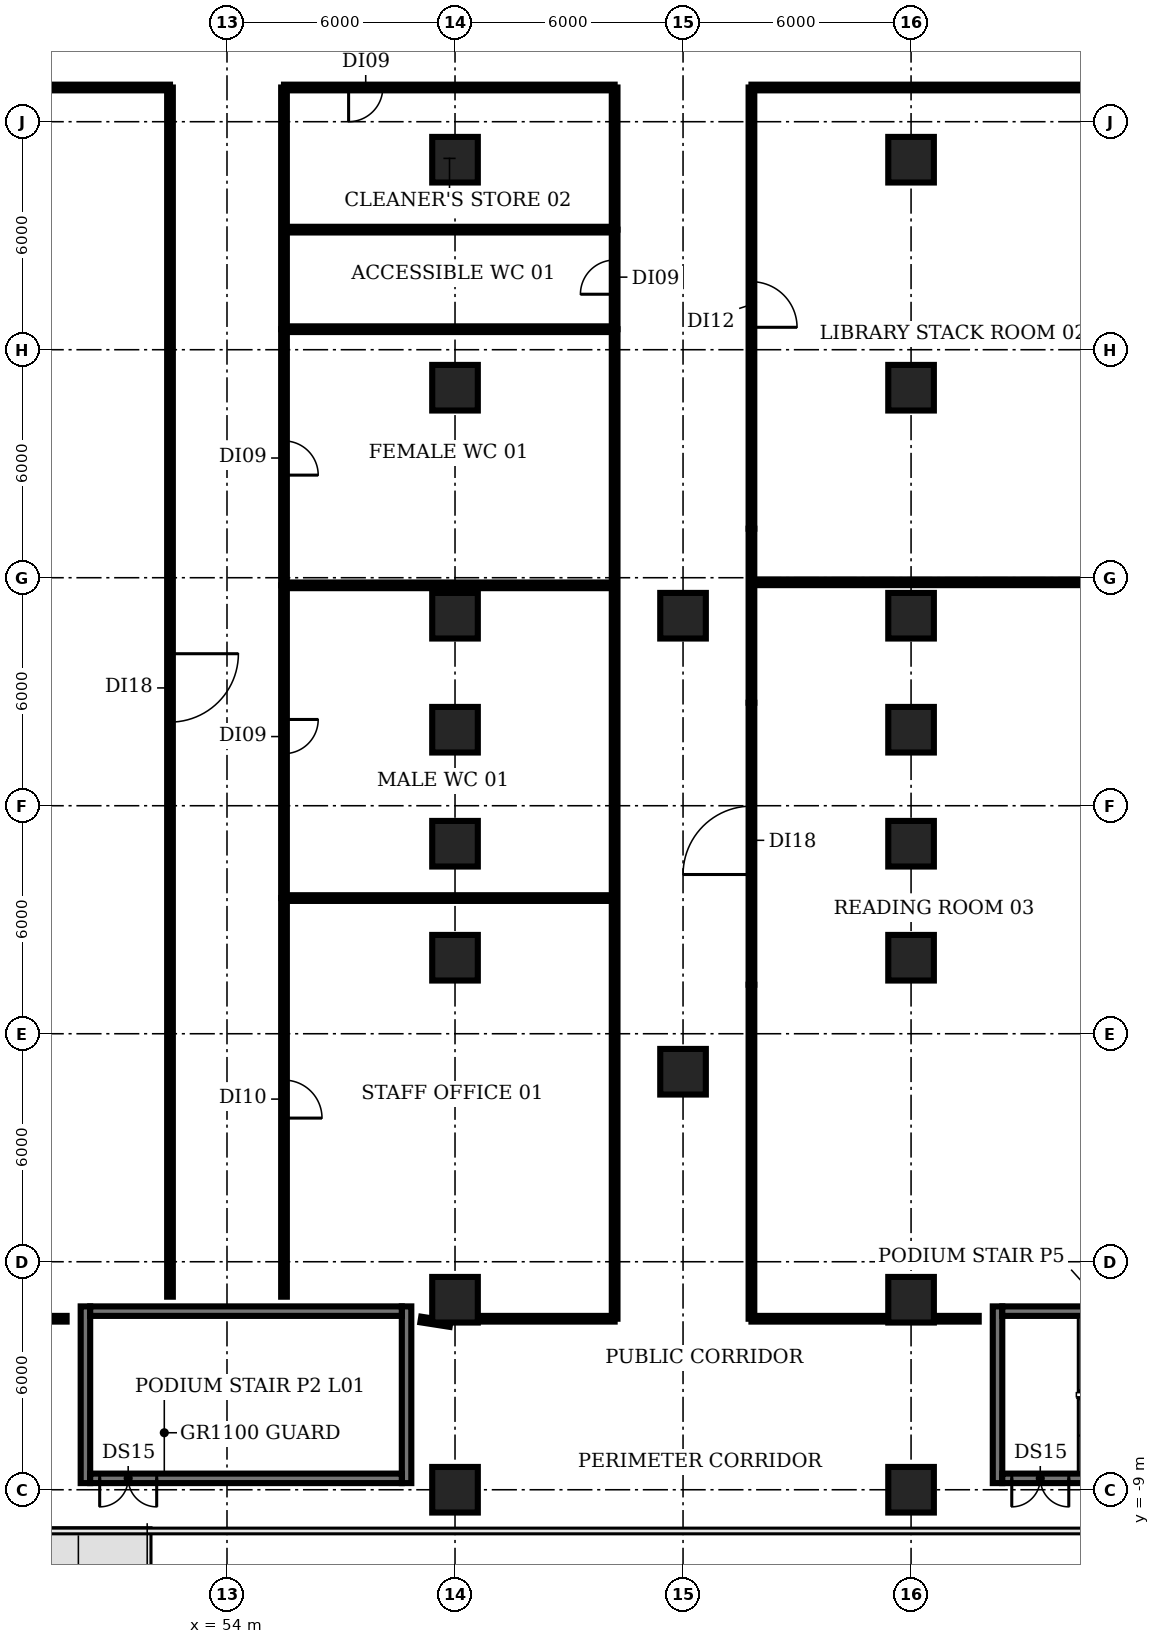
"""IFC4 building model, lengths in metres.
Left out: names, types, materials, properties, quantities, classifications, styles, units other than length and angle.
Written with IfcOpenShell. Run it as: python <this file> out.ifc"""

import sys

from ifc_helpers import new_model, si_unit, direction, frame, frame_2d, origin, origin_2d, place, context, subcontext, project, spatial, rectangle, extrude, element, fill, save


model = new_model("IFC4")
c1 = context("Model", 3, precision=1e-05, world=origin(), true_north=direction((0.0, 1.0)))
c2 = subcontext(c1, "Body", "Model", "MODEL_VIEW")
j1 = project(units=[si_unit("LENGTHUNIT", "METRE"), si_unit("PLANEANGLEUNIT", "RADIAN")], contexts=[c1])
p1 = place(None, origin())
s1 = spatial("IfcSite", under=j1, at=p1, CompositionType="ELEMENT")
p2 = place(p1, origin())
s2 = spatial("IfcBuilding", under=s1, at=p2, CompositionType="ELEMENT")
p3 = place(p2, frame((0.0, 0.0, 6.0)))
s3 = spatial("IfcBuildingStorey", under=s2, at=p3, CompositionType="ELEMENT", Elevation=6.0)
for number, where, z_axis, x_axis in (
    (1, (60.0, -9.0, 0.0), (0.0, 0.0, 1.0), (1.0, 0.0, 0.0)),
    (2, (60.0, -4.0, 0.0), (0.0, 0.0, 1.0), (1.0, 0.0, 0.0)),
    (3, (60.0, 5.0, 0.0), (0.0, 0.0, 1.0), (1.0, 0.0, 0.0)),
    (4, (60.0, 8.0, 0.0), (0.0, 0.0, 1.0), (1.0, 0.0, 0.0)),
    (5, (60.0, 11.0, 0.0), (0.0, 0.0, 1.0), (1.0, 0.0, 0.0)),
    (6, (60.0, 14.0, 0.0), (0.0, 0.0, 1.0), (1.0, 0.0, 0.0)),
    (7, (60.0, 20.0, 0.0), (0.0, 0.0, 1.0), (1.0, 0.0, 0.0)),
    (8, (60.0, 26.0, 0.0), (0.0, 0.0, 1.0), (1.0, 0.0, 0.0)),
    (9, (66.0, 2.0, 0.0), (0.0, 0.0, 1.0), (1.0, 0.0, 0.0)),
    (10, (66.0, 14.0, 0.0), (0.0, 0.0, 1.0), (1.0, 0.0, 0.0)),
    (11, (72.0, -9.0, 0.0), (0.0, 0.0, 1.0), (1.0, 0.0, 0.0)),
    (12, (72.0, -4.0, 0.0), (0.0, 0.0, 1.0), (1.0, 0.0, 0.0)),
    (13, (72.0, 5.0, 0.0), (0.0, 0.0, 1.0), (1.0, 0.0, 0.0)),
    (14, (72.0, 8.0, 0.0), (0.0, 0.0, 1.0), (1.0, 0.0, 0.0)),
    (15, (72.0, 11.0, 0.0), (0.0, 0.0, 1.0), (1.0, 0.0, 0.0)),
    (16, (72.0, 14.0, 0.0), (0.0, 0.0, 1.0), (1.0, 0.0, 0.0)),
    (17, (72.0, 20.0, 0.0), (0.0, 0.0, 1.0), (1.0, 0.0, 0.0)),
    (18, (72.0, 26.0, 0.0), (0.0, 0.0, 1.0), (1.0, 0.0, 0.0)),
):
    element("IfcColumn", number, at=place(p3, frame(where, z_axis=z_axis, x_axis=x_axis)), inside=s3, PredefinedType="COLUMN", context=c2, shape_type="SweptSolid", body=[
        extrude(rectangle(XDim=1.2, YDim=1.2, at=origin_2d()), origin(), (0.0, 0.0, 1.0), 4.6),
    ])
for number, where, z_axis, x_axis in (
    (19, (50.275, -8.825, 0.0), (0.0, 0.0, 1.0), (0.0, 1.0, 0.0)),
    (20, (58.725, -8.825, 0.0), (0.0, 0.0, 1.0), (0.0, 1.0, 0.0)),
):
    element("IfcWall", number, at=place(p3, frame(where, z_axis=z_axis, x_axis=x_axis)), inside=s3, PredefinedType="SHEAR", context=c2, shape_type="SweptSolid", body=[
        extrude(rectangle(XDim=4.65, YDim=0.25, at=frame_2d((2.325, 0.0))), origin(), (0.0, 0.0, 1.0), 4.6),
    ])
p4 = place(p3, frame((58.6, -8.7, 0.0), z_axis=(0.0, 0.0, 1.0), x_axis=(-1.0, 0.0, 0.0)))
e21 = element("IfcWall", 21, at=p4, inside=s3, PredefinedType="SHEAR", context=c2, shape_type="SweptSolid", body=[
    extrude(rectangle(XDim=8.2, YDim=0.25, at=frame_2d((4.1, 0.0))), origin(), (0.0, 0.0, 1.0), 4.6),
])
p5 = place(p4, frame((6.45, 0.0, 0.0)))
e22 = element("IfcOpeningElement", 22, at=p5, cuts=e21, PredefinedType="OPENING", context=c2, shape_type="SweptSolid", body=[
    extrude(rectangle(XDim=1.5, YDim=2.1, at=frame_2d((0.75, 1.05))), frame((0.0, 0.135, 0.0), z_axis=(0.0, -1.0, 0.0), x_axis=(1.0, 0.0, 0.0)), (0.0, 0.0, 1.0), 0.27),
])
p6 = place(p3, frame((50.4, -4.3, 0.0), z_axis=(0.0, 0.0, 1.0), x_axis=(1.0, 0.0, 0.0)))
e23 = element("IfcWall", 23, at=p6, inside=s3, PredefinedType="SHEAR", context=c2, shape_type="SweptSolid", body=[
    extrude(rectangle(XDim=8.2, YDim=0.25, at=frame_2d((4.1, 0.0))), origin(), (0.0, 0.0, 1.0), 4.6),
])
p7 = place(p3, frame((74.275, -8.825, 0.0), z_axis=(0.0, 0.0, 1.0), x_axis=(0.0, 1.0, 0.0)))
e24 = element("IfcWall", 24, at=p7, inside=s3, PredefinedType="SHEAR", context=c2, shape_type="SweptSolid", body=[
    extrude(rectangle(XDim=4.65, YDim=0.25, at=frame_2d((2.325, 0.0))), origin(), (0.0, 0.0, 1.0), 4.6),
])
p8 = place(p3, frame((82.6, -8.7, 0.0), z_axis=(0.0, 0.0, 1.0), x_axis=(-1.0, 0.0, 0.0)))
e25 = element("IfcWall", 25, at=p8, inside=s3, PredefinedType="SHEAR", context=c2, shape_type="SweptSolid", body=[
    extrude(rectangle(XDim=8.2, YDim=0.25, at=frame_2d((4.1, 0.0))), origin(), (0.0, 0.0, 1.0), 4.6),
])
p9 = place(p8, frame((6.45, 0.0, 0.0)))
e26 = element("IfcOpeningElement", 26, at=p9, cuts=e25, PredefinedType="OPENING", context=c2, shape_type="SweptSolid", body=[
    extrude(rectangle(XDim=1.5, YDim=2.1, at=frame_2d((0.75, 1.05))), frame((0.0, 0.135, 0.0), z_axis=(0.0, -1.0, 0.0), x_axis=(1.0, 0.0, 0.0)), (0.0, 0.0, 1.0), 0.27),
])
p10 = place(p3, frame((74.4, -4.3, 0.0), z_axis=(0.0, 0.0, 1.0), x_axis=(1.0, 0.0, 0.0)))
e27 = element("IfcWall", 27, at=p10, inside=s3, PredefinedType="SHEAR", context=c2, shape_type="SweptSolid", body=[
    extrude(rectangle(XDim=8.2, YDim=0.25, at=frame_2d((4.1, 0.0))), origin(), (0.0, 0.0, 1.0), 4.6),
])
p11 = place(p3, frame((31.5, 27.9, 0.0), z_axis=(0.0, 0.0, 1.0), x_axis=(1.0, 0.0, 0.0)))
e28 = element("IfcWall", 28, at=p11, inside=s3, PredefinedType="PARTITIONING", context=c2, shape_type="SweptSolid", body=[
    extrude(rectangle(XDim=21.0, YDim=0.15, at=frame_2d((10.5, 0.0))), origin(), (0.0, 0.0, 1.0), 3.18),
])
p12 = place(p3, frame((48.46, -4.5, 0.0), z_axis=(0.0, 0.0, 1.0), x_axis=(1.0, 0.0, 0.0)))
e29 = element("IfcWall", 29, at=p12, inside=s3, PredefinedType="PARTITIONING", context=c2, shape_type="SweptSolid", body=[
    extrude(rectangle(XDim=1.32, YDim=0.15, at=frame_2d((0.66, 0.0))), origin(), (0.0, 0.0, 1.0), 3.18),
])
p13 = place(p3, frame((52.5, 27.9, 0.0), z_axis=(0.0, 0.0, 1.0), x_axis=(0.0, -1.0, 0.0)))
e30 = element("IfcWall", 30, at=p13, inside=s3, PredefinedType="PARTITIONING", context=c2, shape_type="SweptSolid", body=[
    extrude(rectangle(XDim=31.82, YDim=0.15, at=frame_2d((15.91, 0.0))), origin(), (0.0, 0.0, 1.0), 3.18),
])
p14 = place(p13, frame((14.9, 0.0, 0.0)))
e31 = element("IfcOpeningElement", 31, at=p14, cuts=e30, PredefinedType="OPENING", context=c2, shape_type="SweptSolid", body=[
    extrude(rectangle(XDim=1.8, YDim=2.1, at=frame_2d((0.9, 1.05))), frame((0.0, 0.085, 0.0), z_axis=(0.0, -1.0, 0.0), x_axis=(1.0, 0.0, 0.0)), (0.0, 0.0, 1.0), 0.17),
])
p15 = place(p3, frame((55.5, 6.57, 0.0), z_axis=(0.0, 0.0, 1.0), x_axis=(0.0, -1.0, 0.0)))
e32 = element("IfcWall", 32, at=p15, inside=s3, PredefinedType="PARTITIONING", context=c2, shape_type="SweptSolid", body=[
    extrude(rectangle(XDim=10.49, YDim=0.15, at=frame_2d((5.245, 0.0))), origin(), (0.0, 0.0, 1.0), 3.18),
])
p16 = place(p15, frame((4.79, 0.0, 0.0)))
e33 = element("IfcOpeningElement", 33, at=p16, cuts=e32, PredefinedType="OPENING", context=c2, shape_type="SweptSolid", body=[
    extrude(rectangle(XDim=1.0, YDim=2.1, at=frame_2d((0.5, 1.05))), frame((0.0, 0.085, 0.0), z_axis=(0.0, -1.0, 0.0), x_axis=(1.0, 0.0, 0.0)), (0.0, 0.0, 1.0), 0.17),
])
p17 = place(p3, frame((55.5, 6.57, 0.0), z_axis=(0.0, 0.0, 1.0), x_axis=(1.0, 0.0, 0.0)))
e34 = element("IfcWall", 34, at=p17, inside=s3, PredefinedType="PARTITIONING", context=c2, shape_type="SweptSolid", body=[
    extrude(rectangle(XDim=8.7, YDim=0.15, at=frame_2d((4.35, 0.0))), origin(), (0.0, 0.0, 1.0), 3.18),
])
p18 = place(p3, frame((55.5, 14.8, 0.0), z_axis=(0.0, 0.0, 1.0), x_axis=(0.0, -1.0, 0.0)))
e35 = element("IfcWall", 35, at=p18, inside=s3, PredefinedType="PARTITIONING", context=c2, shape_type="SweptSolid", body=[
    extrude(rectangle(XDim=8.23, YDim=0.15, at=frame_2d((4.115, 0.0))), origin(), (0.0, 0.0, 1.0), 3.18),
])
p19 = place(p18, frame((3.53, 0.0, 0.0)))
e36 = element("IfcOpeningElement", 36, at=p19, cuts=e35, PredefinedType="OPENING", context=c2, shape_type="SweptSolid", body=[
    extrude(rectangle(XDim=0.9, YDim=2.1, at=frame_2d((0.45, 1.05))), frame((0.0, 0.085, 0.0), z_axis=(0.0, -1.0, 0.0), x_axis=(1.0, 0.0, 0.0)), (0.0, 0.0, 1.0), 0.17),
])
p20 = place(p3, frame((55.5, 14.8, 0.0), z_axis=(0.0, 0.0, 1.0), x_axis=(1.0, 0.0, 0.0)))
e37 = element("IfcWall", 37, at=p20, inside=s3, PredefinedType="PARTITIONING", context=c2, shape_type="SweptSolid", body=[
    extrude(rectangle(XDim=8.7, YDim=0.15, at=frame_2d((4.35, 0.0))), origin(), (0.0, 0.0, 1.0), 3.18),
])
p21 = place(p3, frame((55.5, 21.54, 0.0), z_axis=(0.0, 0.0, 1.0), x_axis=(0.0, -1.0, 0.0)))
e38 = element("IfcWall", 38, at=p21, inside=s3, PredefinedType="PARTITIONING", context=c2, shape_type="SweptSolid", body=[
    extrude(rectangle(XDim=6.74, YDim=0.15, at=frame_2d((3.37, 0.0))), origin(), (0.0, 0.0, 1.0), 3.18),
])
p22 = place(p21, frame((2.94, 0.0, 0.0)))
e39 = element("IfcOpeningElement", 39, at=p22, cuts=e38, PredefinedType="OPENING", context=c2, shape_type="SweptSolid", body=[
    extrude(rectangle(XDim=0.9, YDim=2.1, at=frame_2d((0.45, 1.05))), frame((0.0, 0.085, 0.0), z_axis=(0.0, -1.0, 0.0), x_axis=(1.0, 0.0, 0.0)), (0.0, 0.0, 1.0), 0.17),
])
p23 = place(p3, frame((55.5, 21.54, 0.0), z_axis=(0.0, 0.0, 1.0), x_axis=(0.0, 1.0, 0.0)))
e40 = element("IfcWall", 40, at=p23, inside=s3, PredefinedType="PARTITIONING", context=c2, shape_type="SweptSolid", body=[
    extrude(rectangle(XDim=6.36, YDim=0.15, at=frame_2d((3.18, 0.0))), origin(), (0.0, 0.0, 1.0), 3.18),
])
for number, where, z_axis, x_axis in (
    (41, (55.5, 21.54, 0.0), (0.0, 0.0, 1.0), (1.0, 0.0, 0.0)),
    (42, (55.5, 24.16, 0.0), (0.0, 0.0, 1.0), (1.0, 0.0, 0.0)),
):
    element("IfcWall", number, at=place(p3, frame(where, z_axis=z_axis, x_axis=x_axis)), inside=s3, PredefinedType="PARTITIONING", context=c2, shape_type="SweptSolid", body=[
        extrude(rectangle(XDim=8.7, YDim=0.15, at=frame_2d((4.35, 0.0))), origin(), (0.0, 0.0, 1.0), 3.18),
    ])
p24 = place(p3, frame((59.1, -4.52, 0.0), z_axis=(0.0, 0.0, 1.0), x_axis=(0.988098486873, -0.153822560892, 0.0)))
e43 = element("IfcWall", 43, at=p24, inside=s3, PredefinedType="PARTITIONING", context=c2, shape_type="SweptSolid", body=[
    extrude(rectangle(XDim=0.779, YDim=0.15, at=frame_2d((0.39, 0.0))), origin(), (0.0, 0.0, 1.0), 3.18),
])
p25 = place(p3, frame((60.46, -4.5, 0.0), z_axis=(0.0, 0.0, 1.0), x_axis=(1.0, 0.0, 0.0)))
e44 = element("IfcWall", 44, at=p25, inside=s3, PredefinedType="PARTITIONING", context=c2, shape_type="SweptSolid", body=[
    extrude(rectangle(XDim=3.74, YDim=0.15, at=frame_2d((1.87, 0.0))), origin(), (0.0, 0.0, 1.0), 3.18),
])
p26 = place(p3, frame((64.2, -4.5, 0.0), z_axis=(0.0, 0.0, 1.0), x_axis=(0.0, 1.0, 0.0)))
e45 = element("IfcWall", 45, at=p26, inside=s3, PredefinedType="PARTITIONING", context=c2, shape_type="SweptSolid", body=[
    extrude(rectangle(XDim=26.04, YDim=0.15, at=frame_2d((13.02, 0.0))), origin(), (0.0, 0.0, 1.0), 3.18),
])
p27 = place(p3, frame((64.2, 21.54, 0.0), z_axis=(0.0, 0.0, 1.0), x_axis=(0.0, 1.0, 0.0)))
e46 = element("IfcWall", 46, at=p27, inside=s3, PredefinedType="PARTITIONING", context=c2, shape_type="SweptSolid", body=[
    extrude(rectangle(XDim=2.62, YDim=0.15, at=frame_2d((1.31, 0.0))), origin(), (0.0, 0.0, 1.0), 3.18),
])
p28 = place(p27, frame((0.92, 0.0, 0.0)))
e47 = element("IfcOpeningElement", 47, at=p28, cuts=e46, PredefinedType="OPENING", context=c2, shape_type="SweptSolid", body=[
    extrude(rectangle(XDim=0.9, YDim=2.1, at=frame_2d((0.45, 1.05))), frame((0.0, 0.085, 0.0), z_axis=(0.0, -1.0, 0.0), x_axis=(1.0, 0.0, 0.0)), (0.0, 0.0, 1.0), 0.17),
])
p29 = place(p3, frame((64.2, 24.16, 0.0), z_axis=(0.0, 0.0, 1.0), x_axis=(0.0, 1.0, 0.0)))
e48 = element("IfcWall", 48, at=p29, inside=s3, PredefinedType="PARTITIONING", context=c2, shape_type="SweptSolid", body=[
    extrude(rectangle(XDim=3.74, YDim=0.15, at=frame_2d((1.87, 0.0))), origin(), (0.0, 0.0, 1.0), 3.18),
])
p30 = place(p3, frame((64.2, 27.9, 0.0), z_axis=(0.0, 0.0, 1.0), x_axis=(-1.0, 0.0, 0.0)))
e49 = element("IfcWall", 49, at=p30, inside=s3, PredefinedType="PARTITIONING", context=c2, shape_type="SweptSolid", body=[
    extrude(rectangle(XDim=8.7, YDim=0.15, at=frame_2d((4.35, 0.0))), origin(), (0.0, 0.0, 1.0), 3.18),
])
p31 = place(p30, frame((6.1, 0.0, 0.0)))
e50 = element("IfcOpeningElement", 50, at=p31, cuts=e49, PredefinedType="OPENING", context=c2, shape_type="SweptSolid", body=[
    extrude(rectangle(XDim=0.9, YDim=2.1, at=frame_2d((0.45, 1.05))), frame((0.0, 0.085, 0.0), z_axis=(0.0, -1.0, 0.0), x_axis=(1.0, 0.0, 0.0)), (0.0, 0.0, 1.0), 0.17),
])
p32 = place(p3, frame((67.8, -4.5, 0.0), z_axis=(0.0, 0.0, 1.0), x_axis=(0.0, 1.0, 0.0)))
e51 = element("IfcWall", 51, at=p32, inside=s3, PredefinedType="PARTITIONING", context=c2, shape_type="SweptSolid", body=[
    extrude(rectangle(XDim=8.79, YDim=0.15, at=frame_2d((4.395, 0.0))), origin(), (0.0, 0.0, 1.0), 3.18),
])
p33 = place(p3, frame((67.8, -4.5, 0.0), z_axis=(0.0, 0.0, 1.0), x_axis=(1.0, 0.0, 0.0)))
e52 = element("IfcWall", 52, at=p33, inside=s3, PredefinedType="PARTITIONING", context=c2, shape_type="SweptSolid", body=[
    extrude(rectangle(XDim=3.74, YDim=0.15, at=frame_2d((1.87, 0.0))), origin(), (0.0, 0.0, 1.0), 3.18),
])
p34 = place(p3, frame((67.8, 4.29, 0.0), z_axis=(0.0, 0.0, 1.0), x_axis=(0.0, 1.0, 0.0)))
e53 = element("IfcWall", 53, at=p34, inside=s3, PredefinedType="PARTITIONING", context=c2, shape_type="SweptSolid", body=[
    extrude(rectangle(XDim=7.42, YDim=0.15, at=frame_2d((3.71, 0.0))), origin(), (0.0, 0.0, 1.0), 3.18),
])
p35 = place(p34, frame((2.9, 0.0, 0.0)))
e54 = element("IfcOpeningElement", 54, at=p35, cuts=e53, PredefinedType="OPENING", context=c2, shape_type="SweptSolid", body=[
    extrude(rectangle(XDim=1.8, YDim=2.1, at=frame_2d((0.9, 1.05))), frame((0.0, 0.085, 0.0), z_axis=(0.0, -1.0, 0.0), x_axis=(1.0, 0.0, 0.0)), (0.0, 0.0, 1.0), 0.17),
])
p36 = place(p3, frame((67.8, 11.71, 0.0), z_axis=(0.0, 0.0, 1.0), x_axis=(0.0, 1.0, 0.0)))
e55 = element("IfcWall", 55, at=p36, inside=s3, PredefinedType="PARTITIONING", context=c2, shape_type="SweptSolid", body=[
    extrude(rectangle(XDim=4.58, YDim=0.15, at=frame_2d((2.29, 0.0))), origin(), (0.0, 0.0, 1.0), 3.18),
])
p37 = place(p3, frame((67.8, 14.88, 0.0), z_axis=(0.0, 0.0, 1.0), x_axis=(1.0, 0.0, 0.0)))
e56 = element("IfcWall", 56, at=p37, inside=s3, PredefinedType="PARTITIONING", context=c2, shape_type="SweptSolid", body=[
    extrude(rectangle(XDim=10.2, YDim=0.15, at=frame_2d((5.1, 0.0))), origin(), (0.0, 0.0, 1.0), 3.18),
])
p38 = place(p3, frame((67.8, 27.9, 0.0), z_axis=(0.0, 0.0, 1.0), x_axis=(0.0, -1.0, 0.0)))
e57 = element("IfcWall", 57, at=p38, inside=s3, PredefinedType="PARTITIONING", context=c2, shape_type="SweptSolid", body=[
    extrude(rectangle(XDim=11.61, YDim=0.15, at=frame_2d((5.805, 0.0))), origin(), (0.0, 0.0, 1.0), 3.18),
])
p39 = place(p38, frame((5.11, 0.0, 0.0)))
e58 = element("IfcOpeningElement", 58, at=p39, cuts=e57, PredefinedType="OPENING", context=c2, shape_type="SweptSolid", body=[
    extrude(rectangle(XDim=1.2, YDim=2.1, at=frame_2d((0.6, 1.05))), frame((0.0, 0.085, 0.0), z_axis=(0.0, -1.0, 0.0), x_axis=(1.0, 0.0, 0.0)), (0.0, 0.0, 1.0), 0.17),
])
p40 = place(p3, frame((67.8, 27.9, 0.0), z_axis=(0.0, 0.0, 1.0), x_axis=(1.0, 0.0, 0.0)))
e59 = element("IfcWall", 59, at=p40, inside=s3, PredefinedType="PARTITIONING", context=c2, shape_type="SweptSolid", body=[
    extrude(rectangle(XDim=10.2, YDim=0.15, at=frame_2d((5.1, 0.0))), origin(), (0.0, 0.0, 1.0), 3.18),
])
p41 = place(p3, frame((72.46, -4.5, 0.0), z_axis=(0.0, 0.0, 1.0), x_axis=(1.0, 0.0, 0.0)))
e60 = element("IfcWall", 60, at=p41, inside=s3, PredefinedType="PARTITIONING", context=c2, shape_type="SweptSolid", body=[
    extrude(rectangle(XDim=1.32, YDim=0.15, at=frame_2d((0.66, 0.0))), origin(), (0.0, 0.0, 1.0), 3.18),
])
p42 = place(p5, origin())
e61 = element("IfcDoor", 61, at=p42, inside=s3, OperationType="DOUBLE_DOOR_SINGLE_SWING", PredefinedType="DOOR", context=c2, shape_type="SweptSolid", body=[
    extrude(rectangle(XDim=1.5, YDim=2.1, at=frame_2d((0.75, 1.05))), frame((0.0, 0.025, 0.0), z_axis=(0.0, -1.0, 0.0), x_axis=(1.0, 0.0, 0.0)), (0.0, 0.0, 1.0), 0.05),
])
fill(e22, e61)
p43 = place(p9, origin())
e62 = element("IfcDoor", 62, at=p43, inside=s3, OperationType="DOUBLE_DOOR_SINGLE_SWING", PredefinedType="DOOR", context=c2, shape_type="SweptSolid", body=[
    extrude(rectangle(XDim=1.5, YDim=2.1, at=frame_2d((0.75, 1.05))), frame((0.0, 0.025, 0.0), z_axis=(0.0, -1.0, 0.0), x_axis=(1.0, 0.0, 0.0)), (0.0, 0.0, 1.0), 0.05),
])
fill(e26, e62)
p44 = place(p14, origin())
e63 = element("IfcDoor", 63, at=p44, inside=s3, OperationType="SINGLE_SWING_LEFT", PredefinedType="DOOR", context=c2, shape_type="SweptSolid", body=[
    extrude(rectangle(XDim=1.8, YDim=2.1, at=frame_2d((0.9, 1.05))), frame((0.0, 0.025, 0.0), z_axis=(0.0, -1.0, 0.0), x_axis=(1.0, 0.0, 0.0)), (0.0, 0.0, 1.0), 0.05),
])
fill(e31, e63)
p45 = place(p16, origin())
e64 = element("IfcDoor", 64, at=p45, inside=s3, OperationType="SINGLE_SWING_RIGHT", PredefinedType="DOOR", context=c2, shape_type="SweptSolid", body=[
    extrude(rectangle(XDim=1.0, YDim=2.1, at=frame_2d((0.5, 1.05))), frame((0.0, 0.025, 0.0), z_axis=(0.0, -1.0, 0.0), x_axis=(1.0, 0.0, 0.0)), (0.0, 0.0, 1.0), 0.05),
])
fill(e33, e64)
p46 = place(p19, origin())
e65 = element("IfcDoor", 65, at=p46, inside=s3, OperationType="SINGLE_SWING_LEFT", PredefinedType="DOOR", context=c2, shape_type="SweptSolid", body=[
    extrude(rectangle(XDim=0.9, YDim=2.1, at=frame_2d((0.45, 1.05))), frame((0.0, 0.025, 0.0), z_axis=(0.0, -1.0, 0.0), x_axis=(1.0, 0.0, 0.0)), (0.0, 0.0, 1.0), 0.05),
])
fill(e36, e65)
p47 = place(p22, origin())
e66 = element("IfcDoor", 66, at=p47, inside=s3, OperationType="SINGLE_SWING_RIGHT", PredefinedType="DOOR", context=c2, shape_type="SweptSolid", body=[
    extrude(rectangle(XDim=0.9, YDim=2.1, at=frame_2d((0.45, 1.05))), frame((0.0, 0.025, 0.0), z_axis=(0.0, -1.0, 0.0), x_axis=(1.0, 0.0, 0.0)), (0.0, 0.0, 1.0), 0.05),
])
fill(e39, e66)
p48 = place(p28, origin())
e67 = element("IfcDoor", 67, at=p48, inside=s3, OperationType="SINGLE_SWING_LEFT", PredefinedType="DOOR", context=c2, shape_type="SweptSolid", body=[
    extrude(rectangle(XDim=0.9, YDim=2.1, at=frame_2d((0.45, 1.05))), frame((0.0, 0.025, 0.0), z_axis=(0.0, -1.0, 0.0), x_axis=(1.0, 0.0, 0.0)), (0.0, 0.0, 1.0), 0.05),
])
fill(e47, e67)
p49 = place(p31, origin())
e68 = element("IfcDoor", 68, at=p49, inside=s3, OperationType="SINGLE_SWING_RIGHT", PredefinedType="DOOR", context=c2, shape_type="SweptSolid", body=[
    extrude(rectangle(XDim=0.9, YDim=2.1, at=frame_2d((0.45, 1.05))), frame((0.0, 0.025, 0.0), z_axis=(0.0, -1.0, 0.0), x_axis=(1.0, 0.0, 0.0)), (0.0, 0.0, 1.0), 0.05),
])
fill(e50, e68)
p50 = place(p35, origin())
e69 = element("IfcDoor", 69, at=p50, inside=s3, OperationType="SINGLE_SWING_LEFT", PredefinedType="DOOR", context=c2, shape_type="SweptSolid", body=[
    extrude(rectangle(XDim=1.8, YDim=2.1, at=frame_2d((0.9, 1.05))), frame((0.0, 0.025, 0.0), z_axis=(0.0, -1.0, 0.0), x_axis=(1.0, 0.0, 0.0)), (0.0, 0.0, 1.0), 0.05),
])
fill(e54, e69)
p51 = place(p39, origin())
e70 = element("IfcDoor", 70, at=p51, inside=s3, OperationType="SINGLE_SWING_RIGHT", PredefinedType="DOOR", context=c2, shape_type="SweptSolid", body=[
    extrude(rectangle(XDim=1.2, YDim=2.1, at=frame_2d((0.6, 1.05))), frame((0.0, 0.025, 0.0), z_axis=(0.0, -1.0, 0.0), x_axis=(1.0, 0.0, 0.0)), (0.0, 0.0, 1.0), 0.05),
])
fill(e58, e70)
save(model, sys.argv[1])
